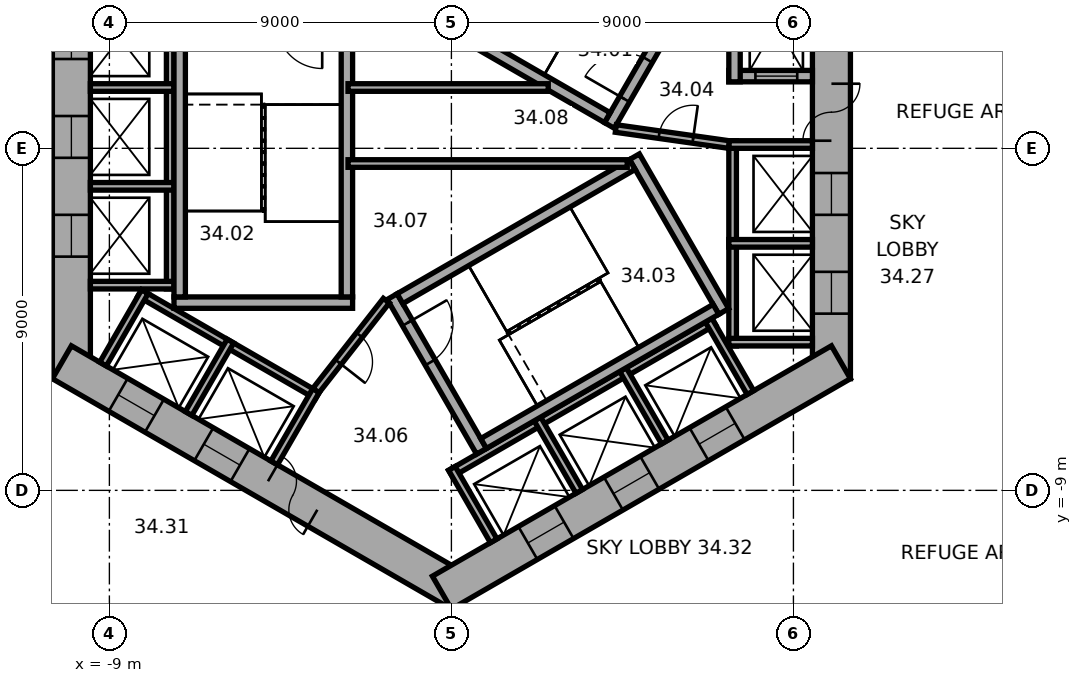
"""IFC4 building model, lengths in metres.
Left out: names, types, materials, properties, quantities, classifications, styles, units other than length and angle.
Written with IfcOpenShell. Run it as: python <this file> out.ifc"""

import sys

from ifc_helpers import new_model, si_unit, direction, frame, frame_2d, origin, place, context, subcontext, project, spatial, rectangle, extrude, element, fill, save


model = new_model("IFC4")
c1 = context("Model", 3, precision=1e-05, world=origin(), true_north=direction((0.0, 1.0)))
c2 = subcontext(c1, "Body", "Model", "MODEL_VIEW")
j1 = project(units=[si_unit("LENGTHUNIT", "METRE"), si_unit("PLANEANGLEUNIT", "RADIAN")], contexts=[c1])
p1 = place(None, origin())
s1 = spatial("IfcSite", under=j1, at=p1, CompositionType="ELEMENT")
p2 = place(p1, origin())
s2 = spatial("IfcBuilding", under=s1, at=p2, CompositionType="ELEMENT")
p3 = place(p2, frame((0.0, 0.0, 139.2)))
s3 = spatial("IfcBuildingStorey", under=s2, at=p3, CompositionType="ELEMENT", Elevation=139.2)
p4 = place(p3, frame((10.0, -6.062, 0.0), z_axis=(0.0, 0.0, 1.0), x_axis=(0.0, 1.0, 0.0)))
e1 = element("IfcWall", 1, at=p4, inside=s3, PredefinedType="SHEAR", context=c2, shape_type="SweptSolid", body=[
    extrude(rectangle(XDim=12.125, YDim=1.0, at=frame_2d((6.062, 0.0))), origin(), (0.0, 0.0, 1.0), 7.4),
])
p5 = place(p4, frame((6.262, 0.0, 0.0)))
e2 = element("IfcOpeningElement", 2, at=p5, cuts=e1, PredefinedType="OPENING", context=c2, shape_type="SweptSolid", body=[
    extrude(rectangle(XDim=1.5, YDim=2.1, at=frame_2d((0.75, 1.05))), frame((0.0, 0.51, 0.0), z_axis=(0.0, -1.0, 0.0), x_axis=(1.0, 0.0, 0.0)), (0.0, 0.0, 1.0), 1.02),
])
p6 = place(p4, frame((1.712, 0.0, 0.0)))
e3 = element("IfcOpeningElement", 3, at=p6, cuts=e1, PredefinedType="OPENING", context=c2, shape_type="SweptSolid", body=[
    extrude(rectangle(XDim=1.1, YDim=2.1, at=frame_2d((0.55, 1.05))), frame((0.0, 0.51, 0.0), z_axis=(0.0, -1.0, 0.0), x_axis=(1.0, 0.0, 0.0)), (0.0, 0.0, 1.0), 1.02),
])
p7 = place(p4, frame((4.312, 0.0, 0.0)))
e4 = element("IfcOpeningElement", 4, at=p7, cuts=e1, PredefinedType="OPENING", context=c2, shape_type="SweptSolid", body=[
    extrude(rectangle(XDim=1.1, YDim=2.1, at=frame_2d((0.55, 1.05))), frame((0.0, 0.51, 0.0), z_axis=(0.0, -1.0, 0.0), x_axis=(1.0, 0.0, 0.0)), (0.0, 0.0, 1.0), 1.02),
])
p8 = place(p3, frame((-10.0, 6.062, 0.0), z_axis=(0.0, 0.0, 1.0), x_axis=(0.0, -1.0, 0.0)))
e5 = element("IfcWall", 5, at=p8, inside=s3, PredefinedType="SHEAR", context=c2, shape_type="SweptSolid", body=[
    extrude(rectangle(XDim=12.125, YDim=1.0, at=frame_2d((6.062, 0.0))), origin(), (0.0, 0.0, 1.0), 7.4),
])
p9 = place(p8, frame((5.212, 0.0, 0.0)))
e6 = element("IfcOpeningElement", 6, at=p9, cuts=e5, PredefinedType="OPENING", context=c2, shape_type="SweptSolid", body=[
    extrude(rectangle(XDim=1.1, YDim=2.1, at=frame_2d((0.55, 1.05))), frame((0.0, 0.51, 0.0), z_axis=(0.0, -1.0, 0.0), x_axis=(1.0, 0.0, 0.0)), (0.0, 0.0, 1.0), 1.02),
])
p10 = place(p8, frame((7.812, 0.0, 0.0)))
e7 = element("IfcOpeningElement", 7, at=p10, cuts=e5, PredefinedType="OPENING", context=c2, shape_type="SweptSolid", body=[
    extrude(rectangle(XDim=1.1, YDim=2.1, at=frame_2d((0.55, 1.05))), frame((0.0, 0.51, 0.0), z_axis=(0.0, -1.0, 0.0), x_axis=(1.0, 0.0, 0.0)), (0.0, 0.0, 1.0), 1.02),
])
p11 = place(p8, frame((2.612, 0.0, 0.0)))
e8 = element("IfcOpeningElement", 8, at=p11, cuts=e5, PredefinedType="OPENING", context=c2, shape_type="SweptSolid", body=[
    extrude(rectangle(XDim=1.1, YDim=2.1, at=frame_2d((0.55, 1.05))), frame((0.0, 0.51, 0.0), z_axis=(0.0, -1.0, 0.0), x_axis=(1.0, 0.0, 0.0)), (0.0, 0.0, 1.0), 1.02),
])
p12 = place(p3, frame((-10.25, -5.629, 0.0), z_axis=(0.0, 0.0, 1.0), x_axis=(0.866022616891, -0.50000482701, 0.0)))
e9 = element("IfcWall", 9, at=p12, inside=s3, PredefinedType="SHEAR", context=c2, shape_type="SweptSolid", body=[
    extrude(rectangle(XDim=12.125, YDim=1.0, at=frame_2d((6.062, 0.0))), origin(), (0.0, 0.0, 1.0), 7.4),
])
p13 = place(p12, frame((6.262, 0.0, 0.0)))
e10 = element("IfcOpeningElement", 10, at=p13, cuts=e9, PredefinedType="OPENING", context=c2, shape_type="SweptSolid", body=[
    extrude(rectangle(XDim=1.5, YDim=2.1, at=frame_2d((0.75, 1.05))), frame((0.0, 0.51, 0.0), z_axis=(0.0, -1.0, 0.0), x_axis=(1.0, 0.0, 0.0)), (0.0, 0.0, 1.0), 1.02),
])
p14 = place(p12, frame((1.712, 0.0, 0.0)))
e11 = element("IfcOpeningElement", 11, at=p14, cuts=e9, PredefinedType="OPENING", context=c2, shape_type="SweptSolid", body=[
    extrude(rectangle(XDim=1.1, YDim=2.1, at=frame_2d((0.55, 1.05))), frame((0.0, 0.51, 0.0), z_axis=(0.0, -1.0, 0.0), x_axis=(1.0, 0.0, 0.0)), (0.0, 0.0, 1.0), 1.02),
])
p15 = place(p12, frame((4.312, 0.0, 0.0)))
e12 = element("IfcOpeningElement", 12, at=p15, cuts=e9, PredefinedType="OPENING", context=c2, shape_type="SweptSolid", body=[
    extrude(rectangle(XDim=1.1, YDim=2.1, at=frame_2d((0.55, 1.05))), frame((0.0, 0.51, 0.0), z_axis=(0.0, -1.0, 0.0), x_axis=(1.0, 0.0, 0.0)), (0.0, 0.0, 1.0), 1.02),
])
p16 = place(p3, frame((-0.25, -11.691, 0.0), z_axis=(0.0, 0.0, 1.0), x_axis=(0.866022616891, 0.50000482701, 0.0)))
e13 = element("IfcWall", 13, at=p16, inside=s3, PredefinedType="SHEAR", context=c2, shape_type="SweptSolid", body=[
    extrude(rectangle(XDim=12.125, YDim=1.0, at=frame_2d((6.062, 0.0))), origin(), (0.0, 0.0, 1.0), 7.4),
])
p17 = place(p16, frame((2.612, 0.0, 0.0)))
e14 = element("IfcOpeningElement", 14, at=p17, cuts=e13, PredefinedType="OPENING", context=c2, shape_type="SweptSolid", body=[
    extrude(rectangle(XDim=1.1, YDim=2.1, at=frame_2d((0.55, 1.05))), frame((0.0, 0.51, 0.0), z_axis=(0.0, -1.0, 0.0), x_axis=(1.0, 0.0, 0.0)), (0.0, 0.0, 1.0), 1.02),
])
p18 = place(p16, frame((5.212, 0.0, 0.0)))
e15 = element("IfcOpeningElement", 15, at=p18, cuts=e13, PredefinedType="OPENING", context=c2, shape_type="SweptSolid", body=[
    extrude(rectangle(XDim=1.1, YDim=2.1, at=frame_2d((0.55, 1.05))), frame((0.0, 0.51, 0.0), z_axis=(0.0, -1.0, 0.0), x_axis=(1.0, 0.0, 0.0)), (0.0, 0.0, 1.0), 1.02),
])
p19 = place(p16, frame((7.812, 0.0, 0.0)))
e16 = element("IfcOpeningElement", 16, at=p19, cuts=e13, PredefinedType="OPENING", context=c2, shape_type="SweptSolid", body=[
    extrude(rectangle(XDim=1.1, YDim=2.1, at=frame_2d((0.55, 1.05))), frame((0.0, 0.51, 0.0), z_axis=(0.0, -1.0, 0.0), x_axis=(1.0, 0.0, 0.0)), (0.0, 0.0, 1.0), 1.02),
])
p20 = place(p3, frame((7.4, -5.2, 0.0), z_axis=(0.0, 0.0, 1.0), x_axis=(0.0, 1.0, 0.0)))
e17 = element("IfcWall", 17, at=p20, inside=s3, PredefinedType="PARTITIONING", context=c2, shape_type="SweptSolid", body=[
    extrude(rectangle(XDim=5.4, YDim=0.2, at=frame_2d((2.7, 0.0))), origin(), (0.0, 0.0, 1.0), 7.12),
])
for number, where, z_axis, x_axis in (
    (18, (7.3, -5.1, 0.0), (0.0, 0.0, 1.0), (1.0, 0.0, 0.0)),
    (19, (7.3, -2.5, 0.0), (0.0, 0.0, 1.0), (1.0, 0.0, 0.0)),
    (20, (7.3, 0.1, 0.0), (0.0, 0.0, 1.0), (1.0, 0.0, 0.0)),
):
    element("IfcWall", number, at=place(p3, frame(where, z_axis=z_axis, x_axis=x_axis)), inside=s3, PredefinedType="PARTITIONING", context=c2, shape_type="SweptSolid", body=[
        extrude(rectangle(XDim=2.2, YDim=0.2, at=frame_2d((1.1, 0.0))), origin(), (0.0, 0.0, 1.0), 7.12),
    ])
p21 = place(p3, frame((-7.4, 4.3, 0.0), z_axis=(0.0, 0.0, 1.0), x_axis=(0.0, -1.0, 0.0)))
e21 = element("IfcWall", 21, at=p21, inside=s3, PredefinedType="PARTITIONING", context=c2, shape_type="SweptSolid", body=[
    extrude(rectangle(XDim=8.0, YDim=0.2, at=frame_2d((4.0, 0.0))), origin(), (0.0, 0.0, 1.0), 7.12),
])
for number, where, z_axis, x_axis in (
    (22, (-7.3, 1.6, 0.0), (0.0, 0.0, 1.0), (-1.0, 0.0, 0.0)),
    (23, (-7.3, -1.0, 0.0), (0.0, 0.0, 1.0), (-1.0, 0.0, 0.0)),
    (24, (-7.3, -3.6, 0.0), (0.0, 0.0, 1.0), (-1.0, 0.0, 0.0)),
):
    element("IfcWall", number, at=place(p3, frame(where, z_axis=z_axis, x_axis=x_axis)), inside=s3, PredefinedType="PARTITIONING", context=c2, shape_type="SweptSolid", body=[
        extrude(rectangle(XDim=2.2, YDim=0.2, at=frame_2d((1.1, 0.0))), origin(), (0.0, 0.0, 1.0), 7.12),
    ])
p22 = place(p3, frame((-8.203, -3.809, 0.0), z_axis=(0.0, 0.0, 1.0), x_axis=(0.866028230842, -0.499995103361, 0.0)))
e25 = element("IfcWall", 25, at=p22, inside=s3, PredefinedType="PARTITIONING", context=c2, shape_type="SweptSolid", body=[
    extrude(rectangle(XDim=5.4, YDim=0.2, at=frame_2d((2.7, 0.0))), origin(), (0.0, 0.0, 1.0), 7.12),
])
for number, where, z_axis, x_axis in (
    (26, (-8.067, -3.772, 0.0), (0.0, 0.0, 1.0), (-0.5, -0.866, 0.0)),
    (27, (-5.815, -5.072, 0.0), (0.0, 0.0, 1.0), (-0.5, -0.866, 0.0)),
):
    element("IfcWall", number, at=place(p3, frame(where, z_axis=z_axis, x_axis=x_axis)), inside=s3, PredefinedType="PARTITIONING", context=c2, shape_type="SweptSolid", body=[
        extrude(rectangle(XDim=2.2, YDim=0.2, at=frame_2d((1.1, 0.0))), origin(), (0.0, 0.0, 1.0), 7.12),
    ])
p23 = place(p3, frame((-3.563, -6.372, 0.0), z_axis=(0.0, 0.0, 1.0), x_axis=(-0.499994660107, -0.866028486751, 0.0)))
e28 = element("IfcWall", 28, at=p23, inside=s3, PredefinedType="PARTITIONING", context=c2, shape_type="SweptSolid", body=[
    extrude(rectangle(XDim=2.2, YDim=0.2, at=frame_2d((1.1, 0.0))), origin(), (0.0, 0.0, 1.0), 7.12),
])
p24 = place(p3, frame((-0.024, -8.559, 0.0), z_axis=(0.0, 0.0, 1.0), x_axis=(0.866026010844, 0.49999894854, 0.0)))
e29 = element("IfcWall", 29, at=p24, inside=s3, PredefinedType="PARTITIONING", context=c2, shape_type="SweptSolid", body=[
    extrude(rectangle(XDim=8.0, YDim=0.2, at=frame_2d((4.0, 0.0))), origin(), (0.0, 0.0, 1.0), 7.12),
])
for number, where, z_axis, x_axis in (
    (30, (0.013, -8.422, 0.0), (0.0, 0.0, 1.0), (0.5, -0.866, 0.0)),
    (31, (2.264, -7.122, 0.0), (0.0, 0.0, 1.0), (0.5, -0.866, 0.0)),
    (32, (4.516, -5.822, 0.0), (0.0, 0.0, 1.0), (0.5, -0.866, 0.0)),
    (33, (6.768, -4.522, 0.0), (0.0, 0.0, 1.0), (0.5, -0.866, 0.0)),
):
    element("IfcWall", number, at=place(p3, frame(where, z_axis=z_axis, x_axis=x_axis)), inside=s3, PredefinedType="PARTITIONING", context=c2, shape_type="SweptSolid", body=[
        extrude(rectangle(XDim=2.2, YDim=0.2, at=frame_2d((1.1, 0.0))), origin(), (0.0, 0.0, 1.0), 7.12),
    ])
p25 = place(p3, frame((4.158, 0.602, 0.0), z_axis=(0.0, 0.0, 1.0), x_axis=(0.499977259774, 0.866038532462, 0.0)))
e34 = element("IfcWall", 34, at=p25, inside=s3, PredefinedType="SHEAR", context=c2, shape_type="SweptSolid", body=[
    extrude(rectangle(XDim=4.7, YDim=0.3, at=frame_2d((2.35, 0.0))), origin(), (0.0, 0.0, 1.0), 7.12),
])
p26 = place(p25, frame((0.8, 0.0, 0.0)))
e35 = element("IfcOpeningElement", 35, at=p26, cuts=e34, PredefinedType="OPENING", context=c2, shape_type="SweptSolid", body=[
    extrude(rectangle(XDim=1.2, YDim=2.1, at=frame_2d((0.6, 1.05))), frame((0.0, 0.16, 0.0), z_axis=(0.0, -1.0, 0.0), x_axis=(1.0, 0.0, 0.0)), (0.0, 0.0, 1.0), 0.32),
])
p27 = place(p3, frame((4.103, 0.807, 0.0), z_axis=(0.0, 0.0, 1.0), x_axis=(-0.866027801685, 0.499995846692, 0.0)))
e36 = element("IfcWall", 36, at=p27, inside=s3, PredefinedType="SHEAR", context=c2, shape_type="SweptSolid", body=[
    extrude(rectangle(XDim=7.06, YDim=0.3, at=frame_2d((3.53, 0.0))), origin(), (0.0, 0.0, 1.0), 7.12),
])
p28 = place(p3, frame((-2.6, -4.06, 0.0), z_axis=(0.0, 0.0, 1.0), x_axis=(-1.0, 0.0, 0.0)))
e37 = element("IfcWall", 37, at=p28, inside=s3, PredefinedType="SHEAR", context=c2, shape_type="SweptSolid", body=[
    extrude(rectangle(XDim=4.7, YDim=0.3, at=frame_2d((2.35, 0.0))), origin(), (0.0, 0.0, 1.0), 7.12),
])
for number, where, z_axis, x_axis in (
    (38, (-2.75, 3.15, 0.0), (0.0, 0.0, 1.0), (0.0, -1.0, 0.0)),
    (39, (-7.15, 3.15, 0.0), (0.0, 0.0, 1.0), (0.0, -1.0, 0.0)),
):
    element("IfcWall", number, at=place(p3, frame(where, z_axis=z_axis, x_axis=x_axis)), inside=s3, PredefinedType="SHEAR", context=c2, shape_type="SweptSolid", body=[
        extrude(rectangle(XDim=7.06, YDim=0.3, at=frame_2d((3.53, 0.0))), origin(), (0.0, 0.0, 1.0), 7.12),
    ])
p29 = place(p3, frame((-1.558, -3.902, 0.0), z_axis=(0.0, 0.0, 1.0), x_axis=(0.499977259774, -0.866038532462, 0.0)))
e40 = element("IfcWall", 40, at=p29, inside=s3, PredefinedType="SHEAR", context=c2, shape_type="SweptSolid", body=[
    extrude(rectangle(XDim=4.7, YDim=0.3, at=frame_2d((2.35, 0.0))), origin(), (0.0, 0.0, 1.0), 7.12),
])
p30 = place(p29, frame((0.8, 0.0, 0.0)))
e41 = element("IfcOpeningElement", 41, at=p30, cuts=e40, PredefinedType="OPENING", context=c2, shape_type="SweptSolid", body=[
    extrude(rectangle(XDim=1.2, YDim=2.1, at=frame_2d((0.6, 1.05))), frame((0.0, 0.16, 0.0), z_axis=(0.0, -1.0, 0.0), x_axis=(1.0, 0.0, 0.0)), (0.0, 0.0, 1.0), 0.32),
])
p31 = place(p3, frame((4.816, -0.222, 0.0), z_axis=(0.0, 0.0, 1.0), x_axis=(0.499977259774, -0.866038532462, 0.0)))
e42 = element("IfcWall", 42, at=p31, inside=s3, PredefinedType="SHEAR", context=c2, shape_type="SweptSolid", body=[
    extrude(rectangle(XDim=4.7, YDim=0.3, at=frame_2d((2.35, 0.0))), origin(), (0.0, 0.0, 1.0), 7.12),
])
for number, where, z_axis, x_axis in (
    (43, (-1.353, -3.957, 0.0), (0.0, 0.0, 1.0), (0.866, 0.5, 0.0)),
    (44, (0.847, -7.767, 0.0), (0.0, 0.0, 1.0), (0.866, 0.5, 0.0)),
):
    element("IfcWall", number, at=place(p3, frame(where, z_axis=z_axis, x_axis=x_axis)), inside=s3, PredefinedType="SHEAR", context=c2, shape_type="SweptSolid", body=[
        extrude(rectangle(XDim=7.06, YDim=0.3, at=frame_2d((3.53, 0.0))), origin(), (0.0, 0.0, 1.0), 7.12),
    ])
p32 = place(p3, frame((7.3, 1.9, 0.0), z_axis=(0.0, 0.0, 1.0), x_axis=(1.0, 0.0, 0.0)))
e45 = element("IfcWall", 45, at=p32, inside=s3, PredefinedType="SHEAR", context=c2, shape_type="SweptSolid", body=[
    extrude(rectangle(XDim=2.2, YDim=0.3, at=frame_2d((1.1, 0.0))), origin(), (0.0, 0.0, 1.0), 7.12),
])
p33 = place(p32, frame((0.7, 0.0, 0.0)))
e46 = element("IfcOpeningElement", 46, at=p33, cuts=e45, PredefinedType="OPENING", context=c2, shape_type="SweptSolid", body=[
    extrude(rectangle(XDim=1.1, YDim=2.1, at=frame_2d((0.55, 1.05))), frame((0.0, 0.16, 0.0), z_axis=(0.0, -1.0, 0.0), x_axis=(1.0, 0.0, 0.0)), (0.0, 0.0, 1.0), 0.32),
])
p34 = place(p3, frame((7.45, 1.75, 0.0), z_axis=(0.0, 0.0, 1.0), x_axis=(0.0, 1.0, 0.0)))
e47 = element("IfcWall", 47, at=p34, inside=s3, PredefinedType="SHEAR", context=c2, shape_type="SweptSolid", body=[
    extrude(rectangle(XDim=3.35, YDim=0.3, at=frame_2d((1.675, 0.0))), origin(), (0.0, 0.0, 1.0), 7.12),
])
p35 = place(p3, frame((4.327, 0.521, 0.0), z_axis=(0.0, 0.0, 1.0), x_axis=(0.990124376366, -0.14019172346, 0.0)))
e48 = element("IfcWall", 48, at=p35, inside=s3, PredefinedType="PARTITIONING", context=c2, shape_type="SweptSolid", body=[
    extrude(rectangle(XDim=3.002, YDim=0.2, at=frame_2d((1.501, 0.0))), origin(), (0.0, 0.0, 1.0), 7.12),
])
p36 = place(p35, frame((1.15, 0.0, 0.0)))
e49 = element("IfcOpeningElement", 49, at=p36, cuts=e48, PredefinedType="OPENING", context=c2, shape_type="SweptSolid", body=[
    extrude(rectangle(XDim=0.9, YDim=2.1, at=frame_2d((0.45, 1.05))), frame((0.0, 0.11, 0.0), z_axis=(0.0, -1.0, 0.0), x_axis=(1.0, 0.0, 0.0)), (0.0, 0.0, 1.0), 0.22),
])
p37 = place(p3, frame((-1.712, -4.008, 0.0), z_axis=(0.0, 0.0, 1.0), x_axis=(-0.616549420702, -0.787316208287, 0.0)))
e50 = element("IfcWall", 50, at=p37, inside=s3, PredefinedType="PARTITIONING", context=c2, shape_type="SweptSolid", body=[
    extrude(rectangle(XDim=3.002, YDim=0.2, at=frame_2d((1.501, 0.0))), origin(), (0.0, 0.0, 1.0), 7.12),
])
p38 = place(p37, frame((1.15, 0.0, 0.0)))
e51 = element("IfcOpeningElement", 51, at=p38, cuts=e50, PredefinedType="OPENING", context=c2, shape_type="SweptSolid", body=[
    extrude(rectangle(XDim=0.9, YDim=2.1, at=frame_2d((0.45, 1.05))), frame((0.0, 0.11, 0.0), z_axis=(0.0, -1.0, 0.0), x_axis=(1.0, 0.0, 0.0)), (0.0, 0.0, 1.0), 0.22),
])
p39 = place(p3, frame((-2.72, -0.4, 0.0), z_axis=(0.0, 0.0, 1.0), x_axis=(1.0, 0.0, 0.0)))
e52 = element("IfcWall", 52, at=p39, inside=s3, PredefinedType="PARTITIONING", context=c2, shape_type="SweptSolid", body=[
    extrude(rectangle(XDim=7.347, YDim=0.2, at=frame_2d((3.674, 0.0))), origin(), (0.0, 0.0, 1.0), 7.12),
])
p40 = place(p3, frame((-2.72, 1.6, 0.0), z_axis=(0.0, 0.0, 1.0), x_axis=(1.0, 0.0, 0.0)))
e53 = element("IfcWall", 53, at=p40, inside=s3, PredefinedType="PARTITIONING", context=c2, shape_type="SweptSolid", body=[
    extrude(rectangle(XDim=5.269, YDim=0.2, at=frame_2d((2.634, 0.0))), origin(), (0.0, 0.0, 1.0), 7.12),
])
p41 = place(p5, origin())
e54 = element("IfcDoor", 54, at=p41, inside=s3, OperationType="DOUBLE_DOOR_SINGLE_SWING", PredefinedType="DOOR", context=c2, shape_type="SweptSolid", body=[
    extrude(rectangle(XDim=1.5, YDim=2.1, at=frame_2d((0.75, 1.05))), frame((0.0, 0.025, 0.0), z_axis=(0.0, -1.0, 0.0), x_axis=(1.0, 0.0, 0.0)), (0.0, 0.0, 1.0), 0.05),
])
fill(e2, e54)
p42 = place(p13, origin())
e55 = element("IfcDoor", 55, at=p42, inside=s3, OperationType="DOUBLE_DOOR_SINGLE_SWING", PredefinedType="DOOR", context=c2, shape_type="SweptSolid", body=[
    extrude(rectangle(XDim=1.5, YDim=2.1, at=frame_2d((0.75, 1.05))), frame((0.0, 0.025, 0.0), z_axis=(0.0, -1.0, 0.0), x_axis=(1.0, 0.0, 0.0)), (0.0, 0.0, 1.0), 0.05),
])
fill(e10, e55)
p43 = place(p26, origin())
e56 = element("IfcDoor", 56, at=p43, inside=s3, OperationType="SINGLE_SWING_RIGHT", PredefinedType="DOOR", context=c2, shape_type="SweptSolid", body=[
    extrude(rectangle(XDim=1.2, YDim=2.1, at=frame_2d((0.6, 1.05))), frame((0.0, 0.025, 0.0), z_axis=(0.0, -1.0, 0.0), x_axis=(1.0, 0.0, 0.0)), (0.0, 0.0, 1.0), 0.05),
])
fill(e35, e56)
p44 = place(p30, origin())
e57 = element("IfcDoor", 57, at=p44, inside=s3, OperationType="SINGLE_SWING_RIGHT", PredefinedType="DOOR", context=c2, shape_type="SweptSolid", body=[
    extrude(rectangle(XDim=1.2, YDim=2.1, at=frame_2d((0.6, 1.05))), frame((0.0, 0.025, 0.0), z_axis=(0.0, -1.0, 0.0), x_axis=(1.0, 0.0, 0.0)), (0.0, 0.0, 1.0), 0.05),
])
fill(e41, e57)
p45 = place(p36, origin())
e58 = element("IfcDoor", 58, at=p45, inside=s3, OperationType="SINGLE_SWING_LEFT", PredefinedType="DOOR", context=c2, shape_type="SweptSolid", body=[
    extrude(rectangle(XDim=0.9, YDim=2.1, at=frame_2d((0.45, 1.05))), frame((0.0, 0.025, 0.0), z_axis=(0.0, -1.0, 0.0), x_axis=(1.0, 0.0, 0.0)), (0.0, 0.0, 1.0), 0.05),
])
fill(e49, e58)
p46 = place(p38, origin())
e59 = element("IfcDoor", 59, at=p46, inside=s3, OperationType="SINGLE_SWING_LEFT", PredefinedType="DOOR", context=c2, shape_type="SweptSolid", body=[
    extrude(rectangle(XDim=0.9, YDim=2.1, at=frame_2d((0.45, 1.05))), frame((0.0, 0.025, 0.0), z_axis=(0.0, -1.0, 0.0), x_axis=(1.0, 0.0, 0.0)), (0.0, 0.0, 1.0), 0.05),
])
fill(e51, e59)
p47 = place(p33, origin())
e60 = element("IfcDoor", 60, at=p47, inside=s3, OperationType="DOUBLE_DOOR_SLIDING", PredefinedType="DOOR", context=c2, shape_type="SweptSolid", body=[
    extrude(rectangle(XDim=1.1, YDim=2.1, at=frame_2d((0.55, 1.05))), frame((0.0, 0.025, 0.0), z_axis=(0.0, -1.0, 0.0), x_axis=(1.0, 0.0, 0.0)), (0.0, 0.0, 1.0), 0.05),
])
fill(e46, e60)
p48 = place(p9, origin())
e61 = element("IfcDoor", 61, at=p48, inside=s3, OperationType="DOUBLE_DOOR_SLIDING", PredefinedType="DOOR", context=c2, shape_type="SweptSolid", body=[
    extrude(rectangle(XDim=1.1, YDim=2.1, at=frame_2d((0.55, 1.05))), frame((0.0, 0.025, 0.0), z_axis=(0.0, -1.0, 0.0), x_axis=(1.0, 0.0, 0.0)), (0.0, 0.0, 1.0), 0.05),
])
fill(e6, e61)
p49 = place(p10, origin())
e62 = element("IfcDoor", 62, at=p49, inside=s3, OperationType="DOUBLE_DOOR_SLIDING", PredefinedType="DOOR", context=c2, shape_type="SweptSolid", body=[
    extrude(rectangle(XDim=1.1, YDim=2.1, at=frame_2d((0.55, 1.05))), frame((0.0, 0.025, 0.0), z_axis=(0.0, -1.0, 0.0), x_axis=(1.0, 0.0, 0.0)), (0.0, 0.0, 1.0), 0.05),
])
fill(e7, e62)
p50 = place(p14, origin())
e63 = element("IfcDoor", 63, at=p50, inside=s3, OperationType="DOUBLE_DOOR_SLIDING", PredefinedType="DOOR", context=c2, shape_type="SweptSolid", body=[
    extrude(rectangle(XDim=1.1, YDim=2.1, at=frame_2d((0.55, 1.05))), frame((0.0, 0.025, 0.0), z_axis=(0.0, -1.0, 0.0), x_axis=(1.0, 0.0, 0.0)), (0.0, 0.0, 1.0), 0.05),
])
fill(e11, e63)
p51 = place(p15, origin())
e64 = element("IfcDoor", 64, at=p51, inside=s3, OperationType="DOUBLE_DOOR_SLIDING", PredefinedType="DOOR", context=c2, shape_type="SweptSolid", body=[
    extrude(rectangle(XDim=1.1, YDim=2.1, at=frame_2d((0.55, 1.05))), frame((0.0, 0.025, 0.0), z_axis=(0.0, -1.0, 0.0), x_axis=(1.0, 0.0, 0.0)), (0.0, 0.0, 1.0), 0.05),
])
fill(e12, e64)
p52 = place(p17, origin())
e65 = element("IfcDoor", 65, at=p52, inside=s3, OperationType="DOUBLE_DOOR_SLIDING", PredefinedType="DOOR", context=c2, shape_type="SweptSolid", body=[
    extrude(rectangle(XDim=1.1, YDim=2.1, at=frame_2d((0.55, 1.05))), frame((0.0, 0.025, 0.0), z_axis=(0.0, -1.0, 0.0), x_axis=(1.0, 0.0, 0.0)), (0.0, 0.0, 1.0), 0.05),
])
fill(e14, e65)
p53 = place(p18, origin())
e66 = element("IfcDoor", 66, at=p53, inside=s3, OperationType="DOUBLE_DOOR_SLIDING", PredefinedType="DOOR", context=c2, shape_type="SweptSolid", body=[
    extrude(rectangle(XDim=1.1, YDim=2.1, at=frame_2d((0.55, 1.05))), frame((0.0, 0.025, 0.0), z_axis=(0.0, -1.0, 0.0), x_axis=(1.0, 0.0, 0.0)), (0.0, 0.0, 1.0), 0.05),
])
fill(e15, e66)
p54 = place(p6, origin())
e67 = element("IfcDoor", 67, at=p54, inside=s3, OperationType="DOUBLE_DOOR_SLIDING", PredefinedType="DOOR", context=c2, shape_type="SweptSolid", body=[
    extrude(rectangle(XDim=1.1, YDim=2.1, at=frame_2d((0.55, 1.05))), frame((0.0, 0.025, 0.0), z_axis=(0.0, -1.0, 0.0), x_axis=(1.0, 0.0, 0.0)), (0.0, 0.0, 1.0), 0.05),
])
fill(e3, e67)
p55 = place(p7, origin())
e68 = element("IfcDoor", 68, at=p55, inside=s3, OperationType="DOUBLE_DOOR_SLIDING", PredefinedType="DOOR", context=c2, shape_type="SweptSolid", body=[
    extrude(rectangle(XDim=1.1, YDim=2.1, at=frame_2d((0.55, 1.05))), frame((0.0, 0.025, 0.0), z_axis=(0.0, -1.0, 0.0), x_axis=(1.0, 0.0, 0.0)), (0.0, 0.0, 1.0), 0.05),
])
fill(e4, e68)
p56 = place(p11, origin())
e69 = element("IfcDoor", 69, at=p56, inside=s3, OperationType="DOUBLE_DOOR_SLIDING", PredefinedType="DOOR", context=c2, shape_type="SweptSolid", body=[
    extrude(rectangle(XDim=1.1, YDim=2.1, at=frame_2d((0.55, 1.05))), frame((0.0, 0.025, 0.0), z_axis=(0.0, -1.0, 0.0), x_axis=(1.0, 0.0, 0.0)), (0.0, 0.0, 1.0), 0.05),
])
fill(e8, e69)
p57 = place(p19, origin())
e70 = element("IfcDoor", 70, at=p57, inside=s3, OperationType="DOUBLE_DOOR_SLIDING", PredefinedType="DOOR", context=c2, shape_type="SweptSolid", body=[
    extrude(rectangle(XDim=1.1, YDim=2.1, at=frame_2d((0.55, 1.05))), frame((0.0, 0.025, 0.0), z_axis=(0.0, -1.0, 0.0), x_axis=(1.0, 0.0, 0.0)), (0.0, 0.0, 1.0), 0.05),
])
fill(e16, e70)
save(model, sys.argv[1])
